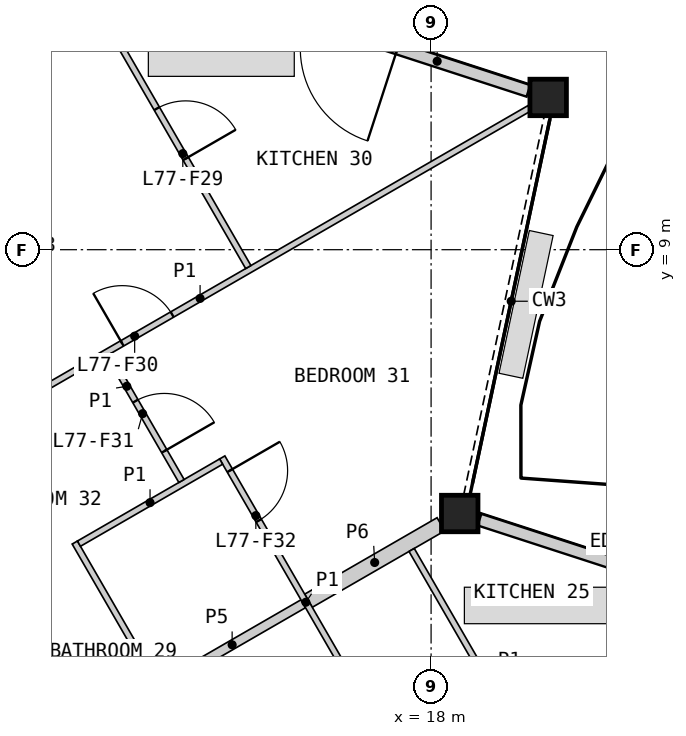
"""IFC4 building model, lengths in metres.
Left out: names, types, materials, properties, quantities, classifications, styles, units other than length and angle.
Written with IfcOpenShell. Run it as: python <this file> out.ifc"""

import sys

from ifc_helpers import new_model, si_unit, direction, frame, frame_2d, origin, origin_2d, place, context, subcontext, project, spatial, rectangle, hollow_rectangle, extrude, element, fill, save


model = new_model("IFC4")
c1 = context("Model", 3, precision=1e-05, world=origin(), true_north=direction((0.0, 1.0)))
c2 = subcontext(c1, "Body", "Model", "MODEL_VIEW")
j1 = project(units=[si_unit("LENGTHUNIT", "METRE"), si_unit("PLANEANGLEUNIT", "RADIAN")], contexts=[c1])
p1 = place(None, origin())
s1 = spatial("IfcSite", under=j1, at=p1, CompositionType="ELEMENT")
p2 = place(p1, origin())
s2 = spatial("IfcBuilding", under=s1, at=p2, CompositionType="ELEMENT")
p3 = place(p2, frame((0.0, 0.0, 342.6)))
s3 = spatial("IfcBuildingStorey", under=s2, at=p3, CompositionType="ELEMENT", Elevation=342.6)
for number, where, z_axis, x_axis in (
    (1, (18.471, 4.661, 0.0), (0.0, 0.0, 1.0), (1.0, 0.0, 0.0)),
    (2, (19.926, 11.504, 0.0), (0.0, 0.0, 1.0), (1.0, 0.0, 0.0)),
):
    element("IfcColumn", number, at=place(p3, frame(where, z_axis=z_axis, x_axis=x_axis)), inside=s3, PredefinedType="COLUMN", context=c2, shape_type="SweptSolid", body=[
        extrude(hollow_rectangle(XDim=0.6, YDim=0.6, WallThickness=0.04, at=origin_2d()), origin(), (0.0, 0.0, 1.0), 3.4),
    ])
p4 = place(p3, frame((24.798, 2.609, 0.0), z_axis=(0.0, 0.0, 1.0), x_axis=(-0.951065616977, 0.308988983952, 0.0)))
e3 = element("IfcWall", 3, at=p4, inside=s3, PredefinedType="SOLIDWALL", context=c2, shape_type="SweptSolid", body=[
    extrude(rectangle(XDim=6.312, YDim=0.2, at=frame_2d((3.156, 0.0))), origin(), (0.0, 0.0, 1.0), 2.488),
])
p5 = place(p4, frame((2.263, 0.0, 0.0)))
e4 = element("IfcOpeningElement", 4, at=p5, cuts=e3, PredefinedType="OPENING", context=c2, shape_type="SweptSolid", body=[
    extrude(rectangle(XDim=1.6, YDim=2.25, at=frame_2d((0.8, 1.125))), frame((0.0, 0.11, 0.0), z_axis=(0.0, -1.0, 0.0), x_axis=(1.0, 0.0, 0.0)), (0.0, 0.0, 1.0), 0.22),
])
p6 = place(p3, frame((19.601, 11.612, 0.0), z_axis=(0.0, 0.0, 1.0), x_axis=(-0.951065041052, 0.308990756638, 0.0)))
e5 = element("IfcWall", 5, at=p6, inside=s3, PredefinedType="SOLIDWALL", context=c2, shape_type="SweptSolid", body=[
    extrude(rectangle(XDim=6.313, YDim=0.2, at=frame_2d((3.156, 0.0))), origin(), (0.0, 0.0, 1.0), 2.488),
])
p7 = place(p6, frame((2.263, 0.0, 0.0)))
e6 = element("IfcOpeningElement", 6, at=p7, cuts=e5, PredefinedType="OPENING", context=c2, shape_type="SweptSolid", body=[
    extrude(rectangle(XDim=1.6, YDim=2.25, at=frame_2d((0.8, 1.125))), frame((0.0, 0.11, 0.0), z_axis=(0.0, -1.0, 0.0), x_axis=(1.0, 0.0, 0.0)), (0.0, 0.0, 1.0), 0.22),
])
p8 = place(p3, frame((8.698, 4.745, 0.0), z_axis=(0.0, 0.0, 1.0), x_axis=(0.499984266882, -0.866034487114, 0.0)))
e7 = element("IfcWall", 7, at=p8, inside=s3, PredefinedType="PARTITIONING", context=c2, shape_type="SweptSolid", body=[
    extrude(rectangle(XDim=8.099, YDim=0.2, at=frame_2d((4.049, 0.0))), origin(), (0.0, 0.0, 1.0), 3.1),
])
p9 = place(p8, frame((5.935, 0.0, 0.0)))
e8 = element("IfcOpeningElement", 8, at=p9, cuts=e7, PredefinedType="OPENING", context=c2, shape_type="SweptSolid", body=[
    extrude(rectangle(XDim=1.0, YDim=2.1, at=frame_2d((0.5, 1.05))), frame((0.0, 0.11, 0.0), z_axis=(0.0, -1.0, 0.0), x_axis=(1.0, 0.0, 0.0)), (0.0, 0.0, 1.0), 0.22),
])
p10 = place(p3, frame((6.066, 9.504, 0.0), z_axis=(0.0, 0.0, 1.0), x_axis=(0.866021168401, 0.500007335828, 0.0)))
e9 = element("IfcWall", 9, at=p10, inside=s3, PredefinedType="PARTITIONING", context=c2, shape_type="SweptSolid", body=[
    extrude(rectangle(XDim=7.962, YDim=0.25, at=frame_2d((3.981, 0.0))), origin(), (0.0, 0.0, 1.0), 2.33),
])
p11 = place(p3, frame((15.984, 3.227, 0.0), z_axis=(0.0, 0.0, 1.0), x_axis=(0.8660174017, 0.500013859761, 0.0)))
e10 = element("IfcWall", 10, at=p11, inside=s3, PredefinedType="PARTITIONING", context=c2, shape_type="SweptSolid", body=[
    extrude(rectangle(XDim=2.514, YDim=0.25, at=frame_2d((1.257, 0.0))), origin(), (0.0, 0.0, 1.0), 2.33),
])
p12 = place(p3, frame((13.559, 1.827, 0.0), z_axis=(0.0, 0.0, 1.0), x_axis=(0.866059108428, 0.4999416173, 0.0)))
e11 = element("IfcWall", 11, at=p12, inside=s3, PredefinedType="PLUMBINGWALL", context=c2, shape_type="SweptSolid", body=[
    extrude(rectangle(XDim=2.7, YDim=0.15, at=frame_2d((1.35, 0.0))), origin(), (0.0, 0.0, 1.0), 2.33),
])
p13 = place(p3, frame((13.863, -4.0, 0.0), z_axis=(0.0, 0.0, 1.0), x_axis=(0.866033203648, 0.499986489997, 0.0)))
e12 = element("IfcWall", 12, at=p13, inside=s3, PredefinedType="PARTITIONING", context=c2, shape_type="SweptSolid", body=[
    extrude(rectangle(XDim=12.646, YDim=0.1, at=frame_2d((6.323, 0.0))), origin(), (0.0, 0.0, 1.0), 2.33),
])
p14 = place(p13, frame((8.319, 0.0, 0.0)))
e13 = element("IfcOpeningElement", 13, at=p14, cuts=e12, PredefinedType="OPENING", context=c2, shape_type="SweptSolid", body=[
    extrude(rectangle(XDim=0.95, YDim=2.1, at=frame_2d((0.475, 1.05))), frame((0.0, 0.06, 0.0), z_axis=(0.0, -1.0, 0.0), x_axis=(1.0, 0.0, 0.0)), (0.0, 0.0, 1.0), 0.12),
])
p15 = place(p3, frame((8.786, 5.073, 0.0), z_axis=(0.0, 0.0, 1.0), x_axis=(0.86602139559, 0.500006942333, 0.0)))
e14 = element("IfcWall", 14, at=p15, inside=s3, PredefinedType="PARTITIONING", context=c2, shape_type="SweptSolid", body=[
    extrude(rectangle(XDim=12.505, YDim=0.1, at=frame_2d((6.252, 0.0))), origin(), (0.0, 0.0, 1.0), 2.33),
])
p16 = place(p15, frame((4.772, 0.0, 0.0)))
e15 = element("IfcOpeningElement", 15, at=p16, cuts=e14, PredefinedType="OPENING", context=c2, shape_type="SweptSolid", body=[
    extrude(rectangle(XDim=0.95, YDim=2.1, at=frame_2d((0.475, 1.05))), frame((0.0, 0.06, 0.0), z_axis=(0.0, -1.0, 0.0), x_axis=(1.0, 0.0, 0.0)), (0.0, 0.0, 1.0), 0.12),
])
p17 = place(p3, frame((9.846, 17.63, 0.0), z_axis=(0.0, 0.0, 1.0), x_axis=(0.500013259472, -0.866017748289, 0.0)))
e16 = element("IfcWall", 16, at=p17, inside=s3, PredefinedType="PARTITIONING", context=c2, shape_type="SweptSolid", body=[
    extrude(rectangle(XDim=10.295, YDim=0.1, at=frame_2d((5.147, 0.0))), origin(), (0.0, 0.0, 1.0), 2.33),
])
p18 = place(p17, frame((7.286, 0.0, 0.0)))
e17 = element("IfcOpeningElement", 17, at=p18, cuts=e16, PredefinedType="OPENING", context=c2, shape_type="SweptSolid", body=[
    extrude(rectangle(XDim=0.95, YDim=2.1, at=frame_2d((0.475, 1.05))), frame((0.0, 0.06, 0.0), z_axis=(0.0, -1.0, 0.0), x_axis=(1.0, 0.0, 0.0)), (0.0, 0.0, 1.0), 0.12),
])
p19 = place(p17, frame((0.954, 0.0, 0.0)))
e18 = element("IfcOpeningElement", 18, at=p19, cuts=e16, PredefinedType="OPENING", context=c2, shape_type="SweptSolid", body=[
    extrude(rectangle(XDim=0.95, YDim=2.1, at=frame_2d((0.475, 1.05))), frame((0.0, 0.06, 0.0), z_axis=(0.0, -1.0, 0.0), x_axis=(1.0, 0.0, 0.0)), (0.0, 0.0, 1.0), 0.12),
])
p20 = place(p3, frame((14.565, 5.583, 0.0), z_axis=(0.0, 0.0, 1.0), x_axis=(0.499996545922, -0.866027397988, 0.0)))
e19 = element("IfcWall", 19, at=p20, inside=s3, PredefinedType="PARTITIONING", context=c2, shape_type="SweptSolid", body=[
    extrude(rectangle(XDim=5.5, YDim=0.1, at=frame_2d((2.75, 0.0))), origin(), (0.0, 0.0, 1.0), 2.33),
])
p21 = place(p20, frame((0.25, 0.0, 0.0)))
e20 = element("IfcOpeningElement", 20, at=p21, cuts=e19, PredefinedType="OPENING", context=c2, shape_type="SweptSolid", body=[
    extrude(rectangle(XDim=0.95, YDim=2.1, at=frame_2d((0.475, 1.05))), frame((0.0, 0.06, 0.0), z_axis=(0.0, -1.0, 0.0), x_axis=(1.0, 0.0, 0.0)), (0.0, 0.0, 1.0), 0.12),
])
p22 = place(p3, frame((12.14, 4.183, 0.0), z_axis=(0.0, 0.0, 1.0), x_axis=(0.499996545922, -0.866027397988, 0.0)))
e21 = element("IfcWall", 21, at=p22, inside=s3, PredefinedType="PARTITIONING", context=c2, shape_type="SweptSolid", body=[
    extrude(rectangle(XDim=5.5, YDim=0.1, at=frame_2d((2.75, 0.0))), origin(), (0.0, 0.0, 1.0), 2.33),
])
p23 = place(p3, frame((17.68, 4.062, 0.0), z_axis=(0.0, 0.0, 1.0), x_axis=(0.499997360652, -0.866026927608, 0.0)))
e22 = element("IfcWall", 22, at=p23, inside=s3, PredefinedType="PARTITIONING", context=c2, shape_type="SweptSolid", body=[
    extrude(rectangle(XDim=5.022, YDim=0.1, at=frame_2d((2.511, 0.0))), origin(), (0.0, 0.0, 1.0), 2.33),
])
p24 = place(p23, frame((3.108, 0.0, 0.0)))
e23 = element("IfcOpeningElement", 23, at=p24, cuts=e22, PredefinedType="OPENING", context=c2, shape_type="SweptSolid", body=[
    extrude(rectangle(XDim=0.95, YDim=2.1, at=frame_2d((0.475, 1.05))), frame((0.0, 0.06, 0.0), z_axis=(0.0, -1.0, 0.0), x_axis=(1.0, 0.0, 0.0)), (0.0, 0.0, 1.0), 0.12),
])
p25 = place(p3, frame((12.209, 4.165, 0.0), z_axis=(0.0, 0.0, 1.0), x_axis=(0.866019956843, 0.50000943426, 0.0)))
e24 = element("IfcWall", 24, at=p25, inside=s3, PredefinedType="PARTITIONING", context=c2, shape_type="SweptSolid", body=[
    extrude(rectangle(XDim=2.7, YDim=0.1, at=frame_2d((1.35, 0.0))), origin(), (0.0, 0.0, 1.0), 2.33),
])
p26 = place(p3, frame((12.696, 7.272, 0.0), z_axis=(0.0, 0.0, 1.0), x_axis=(0.500016292001, -0.866015997389, 0.0)))
e25 = element("IfcWall", 25, at=p26, inside=s3, PredefinedType="PARTITIONING", context=c2, shape_type="SweptSolid", body=[
    extrude(rectangle(XDim=2.397, YDim=0.1, at=frame_2d((1.199, 0.0))), origin(), (0.0, 0.0, 1.0), 2.33),
])
p27 = place(p26, frame((0.882, 0.0, 0.0)))
e26 = element("IfcOpeningElement", 26, at=p27, cuts=e25, PredefinedType="OPENING", context=c2, shape_type="SweptSolid", body=[
    extrude(rectangle(XDim=0.95, YDim=2.1, at=frame_2d((0.475, 1.05))), frame((0.0, 0.06, 0.0), z_axis=(0.0, -1.0, 0.0), x_axis=(1.0, 0.0, 0.0)), (0.0, 0.0, 1.0), 0.12),
])
p28 = place(p18, origin())
e27 = element("IfcDoor", 27, at=p28, inside=s3, OperationType="SINGLE_SWING_RIGHT", PredefinedType="DOOR", context=c2, shape_type="SweptSolid", body=[
    extrude(rectangle(XDim=0.95, YDim=2.1, at=frame_2d((0.475, 1.05))), frame((0.0, 0.025, 0.0), z_axis=(0.0, -1.0, 0.0), x_axis=(1.0, 0.0, 0.0)), (0.0, 0.0, 1.0), 0.05),
])
fill(e17, e27)
p29 = place(p16, origin())
e28 = element("IfcDoor", 28, at=p29, inside=s3, OperationType="SINGLE_SWING_LEFT", PredefinedType="DOOR", context=c2, shape_type="SweptSolid", body=[
    extrude(rectangle(XDim=0.95, YDim=2.1, at=frame_2d((0.475, 1.05))), frame((0.0, 0.025, 0.0), z_axis=(0.0, -1.0, 0.0), x_axis=(1.0, 0.0, 0.0)), (0.0, 0.0, 1.0), 0.05),
])
fill(e15, e28)
p30 = place(p27, origin())
e29 = element("IfcDoor", 29, at=p30, inside=s3, OperationType="SINGLE_SWING_RIGHT", PredefinedType="DOOR", context=c2, shape_type="SweptSolid", body=[
    extrude(rectangle(XDim=0.95, YDim=2.1, at=frame_2d((0.475, 1.05))), frame((0.0, 0.025, 0.0), z_axis=(0.0, -1.0, 0.0), x_axis=(1.0, 0.0, 0.0)), (0.0, 0.0, 1.0), 0.05),
])
fill(e26, e29)
p31 = place(p21, origin())
e30 = element("IfcDoor", 30, at=p31, inside=s3, OperationType="SINGLE_SWING_LEFT", PredefinedType="DOOR", context=c2, shape_type="SweptSolid", body=[
    extrude(rectangle(XDim=0.95, YDim=2.1, at=frame_2d((0.475, 1.05))), frame((0.0, 0.025, 0.0), z_axis=(0.0, -1.0, 0.0), x_axis=(1.0, 0.0, 0.0)), (0.0, 0.0, 1.0), 0.05),
])
fill(e20, e30)
save(model, sys.argv[1])
